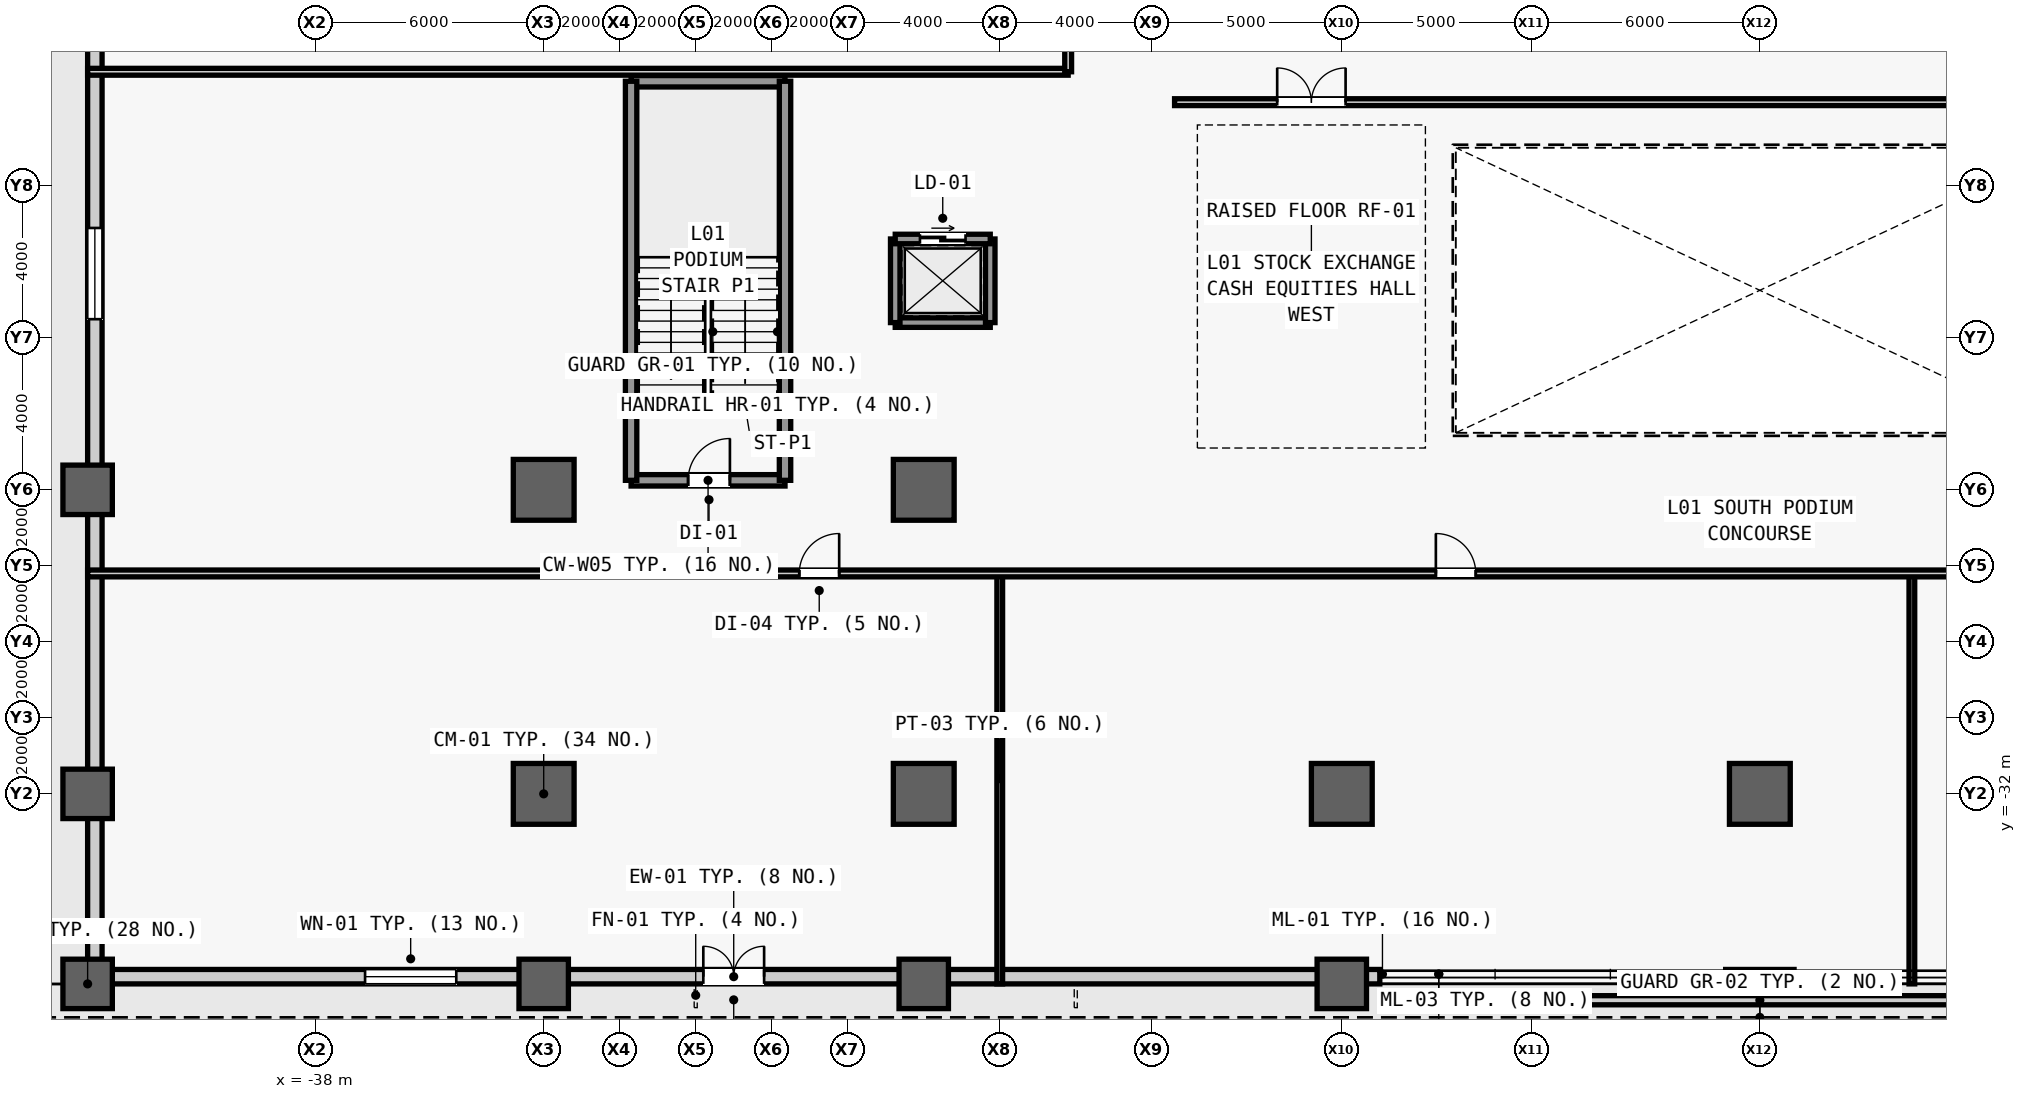
"""IFC4 building model, lengths in metres.
Left out: names, types, materials, properties, quantities, classifications, styles, units other than length and angle.
Written with IfcOpenShell. Run it as: python <this file> out.ifc"""

import sys

from ifc_helpers import new_model, si_unit, direction, frame, frame_2d, origin, origin_2d, place, context, subcontext, project, spatial, rectangle, extrude, source, transform, mapped, element, fill, save


model = new_model("IFC4")
c1 = context("Model", 3, precision=1e-05, world=origin(), true_north=direction((0.0, 1.0)))
c2 = subcontext(c1, "Body", "Model", "MODEL_VIEW")
j1 = project(units=[si_unit("LENGTHUNIT", "METRE"), si_unit("PLANEANGLEUNIT", "RADIAN")], contexts=[c1])
p1 = place(None, origin())
s1 = spatial("IfcSite", under=j1, at=p1, CompositionType="ELEMENT")
p2 = place(p1, origin())
s2 = spatial("IfcBuilding", under=s1, at=p2, CompositionType="ELEMENT")
p3 = place(p2, frame((0.0, 0.0, 6.6)))
s3 = spatial("IfcBuildingStorey", under=s2, at=p3, CompositionType="ELEMENT", Elevation=6.6)
m1 = source(origin(), c2, "Body", "SweptSolid", [
    extrude(rectangle(XDim=1.3, YDim=1.3, at=origin_2d()), origin(), (0.0, 0.0, 1.0), 5.4),
])
for number, where, z_axis, x_axis in (
    (1, (-44.0, -37.0, 0.0), (0.0, 0.0, 1.0), (1.0, 0.0, 0.0)),
    (2, (-44.0, -24.0, 0.0), (0.0, 0.0, 1.0), (1.0, 0.0, 0.0)),
    (3, (-32.0, -37.0, 0.0), (0.0, 0.0, 1.0), (1.0, 0.0, 0.0)),
):
    element("IfcColumn", number, at=place(p3, frame(where, z_axis=z_axis, x_axis=x_axis)), inside=s3, PredefinedType="COLUMN", context=c2, shape_type="MappedRepresentation", body=[
        mapped(m1, transform((0.0, 0.0, 0.0), scale=1.0)),
    ])
m2 = source(origin(), c2, "Body", "SweptSolid", [
    extrude(rectangle(XDim=1.6, YDim=1.6, at=origin_2d()), origin(), (0.0, 0.0, 1.0), 5.4),
])
for number, where, z_axis, x_axis in (
    (4, (-32.0, -32.0, 0.0), (0.0, 0.0, 1.0), (1.0, 0.0, 0.0)),
    (5, (-32.0, -24.0, 0.0), (0.0, 0.0, 1.0), (1.0, 0.0, 0.0)),
):
    element("IfcColumn", number, at=place(p3, frame(where, z_axis=z_axis, x_axis=x_axis)), inside=s3, PredefinedType="COLUMN", context=c2, shape_type="MappedRepresentation", body=[
        mapped(m2, transform((0.0, 0.0, 0.0), scale=1.0)),
    ])
p4 = place(p3, frame((-22.0, -37.0, 0.0), z_axis=(0.0, 0.0, 1.0), x_axis=(1.0, 0.0, 0.0)))
e6 = element("IfcColumn", 6, at=p4, inside=s3, PredefinedType="COLUMN", context=c2, shape_type="MappedRepresentation", body=[
    mapped(m1, transform((0.0, 0.0, 0.0), scale=1.0)),
])
for number, where, z_axis, x_axis in (
    (7, (-22.0, -32.0, 0.0), (0.0, 0.0, 1.0), (1.0, 0.0, 0.0)),
    (8, (-22.0, -24.0, 0.0), (0.0, 0.0, 1.0), (1.0, 0.0, 0.0)),
):
    element("IfcColumn", number, at=place(p3, frame(where, z_axis=z_axis, x_axis=x_axis)), inside=s3, PredefinedType="COLUMN", context=c2, shape_type="MappedRepresentation", body=[
        mapped(m2, transform((0.0, 0.0, 0.0), scale=1.0)),
    ])
p5 = place(p3, frame((-11.0, -37.0, 0.0), z_axis=(0.0, 0.0, 1.0), x_axis=(1.0, 0.0, 0.0)))
e9 = element("IfcColumn", 9, at=p5, inside=s3, PredefinedType="COLUMN", context=c2, shape_type="MappedRepresentation", body=[
    mapped(m1, transform((0.0, 0.0, 0.0), scale=1.0)),
])
for number, where, z_axis, x_axis in (
    (10, (-11.0, -32.0, 0.0), (0.0, 0.0, 1.0), (1.0, 0.0, 0.0)),
    (11, (0.0, -32.0, 0.0), (0.0, 0.0, 1.0), (1.0, 0.0, 0.0)),
):
    element("IfcColumn", number, at=place(p3, frame(where, z_axis=z_axis, x_axis=x_axis)), inside=s3, PredefinedType="COLUMN", context=c2, shape_type="MappedRepresentation", body=[
        mapped(m2, transform((0.0, 0.0, 0.0), scale=1.0)),
    ])
p6 = place(p3, frame((-44.0, -32.0, 0.0), z_axis=(0.0, 0.0, 1.0), x_axis=(1.0, 0.0, 0.0)))
e12 = element("IfcColumn", 12, at=p6, inside=s3, PredefinedType="COLUMN", context=c2, shape_type="MappedRepresentation", body=[
    mapped(m1, transform((0.0, 0.0, 0.0), scale=1.0)),
])
m3 = source(origin(), c2, "Body", "SweptSolid", [
    extrude(rectangle(XDim=34.0, YDim=0.38, at=frame_2d((17.0, 0.0))), origin(), (0.0, 0.0, 1.0), 3.28),
])
p7 = place(p3, frame((-44.0, -36.81, 0.0), z_axis=(0.0, 0.0, 1.0), x_axis=(1.0, 0.0, 0.0)))
e13 = element("IfcWall", 13, at=p7, inside=s3, PredefinedType="STANDARD", context=c2, shape_type="MappedRepresentation", body=[
    mapped(m3, transform((0.0, 0.0, 0.0), scale=1.0)),
])
m4 = source(origin(), c2, "Body", "SweptSolid", [
    extrude(rectangle(XDim=1.6, YDim=2.25, at=frame_2d((0.8, 1.125))), frame((0.0, 0.2, 0.0), z_axis=(0.0, -1.0, 0.0), x_axis=(1.0, 0.0, 0.0)), (0.0, 0.0, 1.0), 0.4),
])
p8 = place(p7, frame((16.2, 0.0, 0.0)))
e14 = element("IfcOpeningElement", 14, at=p8, cuts=e13, PredefinedType="OPENING", context=c2, shape_type="MappedRepresentation", body=[
    mapped(m4, transform((0.0, 0.0, 0.0), scale=1.0)),
])
m5 = source(origin(), c2, "Body", "SweptSolid", [
    extrude(rectangle(XDim=2.4, YDim=2.56, at=frame_2d((1.2, 1.28))), frame((0.0, 0.2, 0.0), z_axis=(0.0, -1.0, 0.0), x_axis=(1.0, 0.0, 0.0)), (0.0, 0.0, 1.0), 0.4),
])
p9 = place(p7, frame((7.3, 0.0, 0.5)))
e15 = element("IfcOpeningElement", 15, at=p9, cuts=e13, PredefinedType="OPENING", context=c2, shape_type="MappedRepresentation", body=[
    mapped(m5, transform((0.0, 0.0, 0.0), scale=1.0)),
])
m6 = source(origin(), c2, "Body", "SweptSolid", [
    extrude(rectangle(XDim=1.8, YDim=0.38, at=frame_2d((0.9, 0.0))), origin(), (0.0, 0.0, 1.0), 3.28),
])
p10 = place(p3, frame((-0.9, -36.81, 0.0), z_axis=(0.0, 0.0, 1.0), x_axis=(1.0, 0.0, 0.0)))
e16 = element("IfcWall", 16, at=p10, inside=s3, PredefinedType="STANDARD", context=c2, shape_type="MappedRepresentation", body=[
    mapped(m6, transform((0.0, 0.0, 0.0), scale=1.0)),
])
m7 = source(origin(), c2, "Body", "SweptSolid", [
    extrude(rectangle(XDim=73.24, YDim=0.38, at=frame_2d((36.62, 0.0))), origin(), (0.0, 0.0, 1.0), 3.28),
])
p11 = place(p3, frame((-43.81, -36.62, 0.0), z_axis=(0.0, 0.0, 1.0), x_axis=(0.0, 1.0, 0.0)))
e17 = element("IfcWall", 17, at=p11, inside=s3, PredefinedType="STANDARD", context=c2, shape_type="MappedRepresentation", body=[
    mapped(m7, transform((0.0, 0.0, 0.0), scale=1.0)),
])
p12 = place(p11, frame((41.82, 0.0, 0.0)))
e18 = element("IfcOpeningElement", 18, at=p12, cuts=e17, PredefinedType="OPENING", context=c2, shape_type="MappedRepresentation", body=[
    mapped(m4, transform((0.0, 0.0, 0.0), scale=1.0)),
])
p13 = place(p11, frame((17.11, 0.0, 0.5)))
e19 = element("IfcOpeningElement", 19, at=p13, cuts=e17, PredefinedType="OPENING", context=c2, shape_type="MappedRepresentation", body=[
    mapped(m5, transform((0.0, 0.0, 0.0), scale=1.0)),
])
p14 = place(p11, frame((53.73, 0.0, 0.5)))
e20 = element("IfcOpeningElement", 20, at=p14, cuts=e17, PredefinedType="OPENING", context=c2, shape_type="MappedRepresentation", body=[
    mapped(m5, transform((0.0, 0.0, 0.0), scale=1.0)),
])
m8 = source(origin(), c2, "Body", "SweptSolid", [
    extrude(rectangle(XDim=20.0, YDim=0.24, at=frame_2d((10.0, 0.0))), origin(), (0.0, 0.0, 1.0), 0.65),
])
p15 = place(p3, frame((-10.0, -37.43, 0.0), z_axis=(0.0, 0.0, 1.0), x_axis=(1.0, 0.0, 0.0)))
e21 = element("IfcWall", 21, at=p15, inside=s3, PredefinedType="STANDARD", context=c2, shape_type="MappedRepresentation", body=[
    mapped(m8, transform((0.0, 0.0, 0.0), scale=1.0)),
])
m9 = source(origin(), c2, "Body", "SweptSolid", [
    extrude(rectangle(XDim=4.05, YDim=0.3, at=frame_2d((2.025, 0.0))), origin(), (0.0, 0.0, 1.0), 5.08),
])
p16 = place(p3, frame((-29.7, -23.75, 0.0), z_axis=(0.0, 0.0, 1.0), x_axis=(1.0, 0.0, 0.0)))
e22 = element("IfcWall", 22, at=p16, inside=s3, PredefinedType="SHEAR", context=c2, shape_type="MappedRepresentation", body=[
    mapped(m9, transform((0.0, 0.0, 0.0), scale=1.0)),
])
m10 = source(origin(), c2, "Body", "SweptSolid", [
    extrude(rectangle(XDim=1.1, YDim=2.2, at=frame_2d((0.55, 1.1))), frame((0.0, 0.16, 0.0), z_axis=(0.0, -1.0, 0.0), x_axis=(1.0, 0.0, 0.0)), (0.0, 0.0, 1.0), 0.32),
])
p17 = place(p16, frame((1.5, 0.0, 0.0)))
e23 = element("IfcOpeningElement", 23, at=p17, cuts=e22, PredefinedType="OPENING", context=c2, shape_type="MappedRepresentation", body=[
    mapped(m10, transform((0.0, 0.0, 0.0), scale=1.0)),
])
p18 = place(p3, frame((-29.7, -13.25, 0.0), z_axis=(0.0, 0.0, 1.0), x_axis=(1.0, 0.0, 0.0)))
e24 = element("IfcWall", 24, at=p18, inside=s3, PredefinedType="SHEAR", context=c2, shape_type="MappedRepresentation", body=[
    mapped(m9, transform((0.0, 0.0, 0.0), scale=1.0)),
])
m11 = source(origin(), c2, "Body", "SweptSolid", [
    extrude(rectangle(XDim=10.5, YDim=0.3, at=frame_2d((5.25, 0.0))), origin(), (0.0, 0.0, 1.0), 5.08),
])
for number, where, z_axis, x_axis in (
    (25, (-29.7, -23.75, 0.0), (0.0, 0.0, 1.0), (0.0, 1.0, 0.0)),
    (26, (-25.65, -23.75, 0.0), (0.0, 0.0, 1.0), (0.0, 1.0, 0.0)),
):
    element("IfcWall", number, at=place(p3, frame(where, z_axis=z_axis, x_axis=x_axis)), inside=s3, PredefinedType="SHEAR", context=c2, shape_type="MappedRepresentation", body=[
        mapped(m11, transform((0.0, 0.0, 0.0), scale=1.0)),
    ])
m12 = source(origin(), c2, "Body", "SweptSolid", [
    extrude(rectangle(XDim=2.5, YDim=0.25, at=frame_2d((1.25, 0.0))), origin(), (0.0, 0.0, 1.0), 5.08),
])
p19 = place(p3, frame((-22.75, -19.6, 0.0), z_axis=(0.0, 0.0, 1.0), x_axis=(1.0, 0.0, 0.0)))
e27 = element("IfcWall", 27, at=p19, inside=s3, PredefinedType="SHEAR", context=c2, shape_type="MappedRepresentation", body=[
    mapped(m12, transform((0.0, 0.0, 0.0), scale=1.0)),
])
m13 = source(origin(), c2, "Body", "SweptSolid", [
    extrude(rectangle(XDim=2.2, YDim=0.25, at=frame_2d((1.1, 0.0))), origin(), (0.0, 0.0, 1.0), 5.08),
])
for number, where, z_axis, x_axis in (
    (28, (-22.75, -19.6, 0.0), (0.0, 0.0, 1.0), (0.0, 1.0, 0.0)),
    (29, (-20.25, -19.6, 0.0), (0.0, 0.0, 1.0), (0.0, 1.0, 0.0)),
):
    element("IfcWall", number, at=place(p3, frame(where, z_axis=z_axis, x_axis=x_axis)), inside=s3, PredefinedType="SHEAR", context=c2, shape_type="MappedRepresentation", body=[
        mapped(m13, transform((0.0, 0.0, 0.0), scale=1.0)),
    ])
p20 = place(p3, frame((-22.75, -17.4, 0.0), z_axis=(0.0, 0.0, 1.0), x_axis=(1.0, 0.0, 0.0)))
e30 = element("IfcWall", 30, at=p20, inside=s3, PredefinedType="SHEAR", context=c2, shape_type="MappedRepresentation", body=[
    mapped(m12, transform((0.0, 0.0, 0.0), scale=1.0)),
])
m14 = source(origin(), c2, "Body", "SweptSolid", [
    extrude(rectangle(XDim=1.2, YDim=2.3, at=frame_2d((0.6, 1.15))), frame((0.0, 0.135, 0.0), z_axis=(0.0, -1.0, 0.0), x_axis=(1.0, 0.0, 0.0)), (0.0, 0.0, 1.0), 0.27),
])
p21 = place(p20, frame((0.65, 0.0, 0.0)))
e31 = element("IfcOpeningElement", 31, at=p21, cuts=e30, PredefinedType="OPENING", context=c2, shape_type="MappedRepresentation", body=[
    mapped(m14, transform((0.0, 0.0, 0.0), scale=1.0)),
])
m15 = source(origin(), c2, "Body", "SweptSolid", [
    extrude(rectangle(XDim=30.8, YDim=0.18, at=frame_2d((15.4, 0.0))), origin(), (0.0, 0.0, 1.0), 5.08),
])
p22 = place(p3, frame((-15.4, -13.8, 0.0), z_axis=(0.0, 0.0, 1.0), x_axis=(1.0, 0.0, 0.0)))
e32 = element("IfcWall", 32, at=p22, inside=s3, PredefinedType="PARTITIONING", context=c2, shape_type="MappedRepresentation", body=[
    mapped(m15, transform((0.0, 0.0, 0.0), scale=1.0)),
])
m16 = source(origin(), c2, "Body", "SweptSolid", [
    extrude(rectangle(XDim=1.8, YDim=2.25, at=frame_2d((0.9, 1.125))), frame((0.0, 0.1, 0.0), z_axis=(0.0, -1.0, 0.0), x_axis=(1.0, 0.0, 0.0)), (0.0, 0.0, 1.0), 0.2),
])
p23 = place(p22, frame((2.7, 0.0, 0.0)))
e33 = element("IfcOpeningElement", 33, at=p23, cuts=e32, PredefinedType="OPENING", context=c2, shape_type="MappedRepresentation", body=[
    mapped(m16, transform((0.0, 0.0, 0.0), scale=1.0)),
])
p24 = place(p22, frame((26.3, 0.0, 0.0)))
e34 = element("IfcOpeningElement", 34, at=p24, cuts=e32, PredefinedType="OPENING", context=c2, shape_type="MappedRepresentation", body=[
    mapped(m16, transform((0.0, 0.0, 0.0), scale=1.0)),
])
m17 = source(origin(), c2, "Body", "SweptSolid", [
    extrude(rectangle(XDim=10.8, YDim=0.15, at=frame_2d((5.4, 0.0))), origin(), (0.0, 0.0, 1.0), 5.08),
])
for number, where, z_axis, x_axis in (
    (35, (-20.0, -37.0, 0.0), (0.0, 0.0, 1.0), (0.0, 1.0, 0.0)),
    (36, (4.0, -37.0, 0.0), (0.0, 0.0, 1.0), (0.0, 1.0, 0.0)),
):
    element("IfcWall", number, at=place(p3, frame(where, z_axis=z_axis, x_axis=x_axis)), inside=s3, PredefinedType="PARTITIONING", context=c2, shape_type="MappedRepresentation", body=[
        mapped(m17, transform((0.0, 0.0, 0.0), scale=1.0)),
    ])
m18 = source(origin(), c2, "Body", "SweptSolid", [
    extrude(rectangle(XDim=88.0, YDim=0.18, at=frame_2d((44.0, 0.0))), origin(), (0.0, 0.0, 1.0), 5.08),
])
p25 = place(p3, frame((-44.0, -26.2, 0.0), z_axis=(0.0, 0.0, 1.0), x_axis=(1.0, 0.0, 0.0)))
e37 = element("IfcWall", 37, at=p25, inside=s3, PredefinedType="PARTITIONING", context=c2, shape_type="MappedRepresentation", body=[
    mapped(m18, transform((0.0, 0.0, 0.0), scale=1.0)),
])
m19 = source(origin(), c2, "Body", "SweptSolid", [
    extrude(rectangle(XDim=1.05, YDim=2.2, at=frame_2d((0.525, 1.1))), frame((0.0, 0.1, 0.0), z_axis=(0.0, -1.0, 0.0), x_axis=(1.0, 0.0, 0.0)), (0.0, 0.0, 1.0), 0.2),
])
p26 = place(p25, frame((18.725, 0.0, 0.0)))
e38 = element("IfcOpeningElement", 38, at=p26, cuts=e37, PredefinedType="OPENING", context=c2, shape_type="MappedRepresentation", body=[
    mapped(m19, transform((0.0, 0.0, 0.0), scale=1.0)),
])
p27 = place(p25, frame((35.475, 0.0, 0.0)))
e39 = element("IfcOpeningElement", 39, at=p27, cuts=e37, PredefinedType="OPENING", context=c2, shape_type="MappedRepresentation", body=[
    mapped(m19, transform((0.0, 0.0, 0.0), scale=1.0)),
])
p28 = place(p25, frame((60.225, 0.0, 0.0)))
e40 = element("IfcOpeningElement", 40, at=p28, cuts=e37, PredefinedType="OPENING", context=c2, shape_type="MappedRepresentation", body=[
    mapped(m19, transform((0.0, 0.0, 0.0), scale=1.0)),
])
m20 = source(origin(), c2, "Body", "SweptSolid", [
    extrude(rectangle(XDim=25.8, YDim=0.18, at=frame_2d((12.9, 0.0))), origin(), (0.0, 0.0, 1.0), 5.08),
])
p29 = place(p3, frame((-44.0, -13.0, 0.0), z_axis=(0.0, 0.0, 1.0), x_axis=(1.0, 0.0, 0.0)))
e41 = element("IfcWall", 41, at=p29, inside=s3, PredefinedType="PARTITIONING", context=c2, shape_type="MappedRepresentation", body=[
    mapped(m20, transform((0.0, 0.0, 0.0), scale=1.0)),
])
m21 = source(origin(), c2, "Body", "SweptSolid", [
    extrude(rectangle(XDim=24.3, YDim=0.18, at=frame_2d((12.15, 0.0))), origin(), (0.0, 0.0, 1.0), 5.08),
])
p30 = place(p3, frame((-18.2, -13.0, 0.0), z_axis=(0.0, 0.0, 1.0), x_axis=(0.0, 1.0, 0.0)))
e42 = element("IfcWall", 42, at=p30, inside=s3, PredefinedType="PARTITIONING", context=c2, shape_type="MappedRepresentation", body=[
    mapped(m21, transform((0.0, 0.0, 0.0), scale=1.0)),
])
m22 = source(origin(), c2, "Body", "SweptSolid", [
    extrude(rectangle(XDim=0.95, YDim=2.15, at=frame_2d((0.475, 1.075))), frame((0.0, 0.1, 0.0), z_axis=(0.0, -1.0, 0.0), x_axis=(1.0, 0.0, 0.0)), (0.0, 0.0, 1.0), 0.2),
])
p31 = place(p30, frame((6.025, 0.0, 0.0)))
e43 = element("IfcOpeningElement", 43, at=p31, cuts=e42, PredefinedType="OPENING", context=c2, shape_type="MappedRepresentation", body=[
    mapped(m22, transform((0.0, 0.0, 0.0), scale=1.0)),
])
p32 = place(p30, frame((18.175, 0.0, 0.0)))
e44 = element("IfcOpeningElement", 44, at=p32, cuts=e42, PredefinedType="OPENING", context=c2, shape_type="MappedRepresentation", body=[
    mapped(m22, transform((0.0, 0.0, 0.0), scale=1.0)),
])
m23 = source(origin(), c2, "Body", "SweptSolid", [
    extrude(rectangle(XDim=1.6, YDim=2.25, at=frame_2d((0.8, 1.125))), frame((0.0, 0.025, 0.0), z_axis=(0.0, -1.0, 0.0), x_axis=(1.0, 0.0, 0.0)), (0.0, 0.0, 1.0), 0.05),
])
p33 = place(p8, origin())
e45 = element("IfcDoor", 45, at=p33, inside=s3, OperationType="DOUBLE_DOOR_SINGLE_SWING", PredefinedType="DOOR", context=c2, shape_type="MappedRepresentation", body=[
    mapped(m23, transform((0.0, 0.0, 0.0), scale=1.0)),
])
fill(e14, e45)
m24 = source(origin(), c2, "Body", "SweptSolid", [
    extrude(rectangle(XDim=2.4, YDim=2.56, at=frame_2d((1.2, 1.28))), frame((0.0, 0.03, 0.0), z_axis=(0.0, -1.0, 0.0), x_axis=(1.0, 0.0, 0.0)), (0.0, 0.0, 1.0), 0.06),
])
p34 = place(p9, origin())
e46 = element("IfcWindow", 46, at=p34, inside=s3, PartitioningType="SINGLE_PANEL", PredefinedType="WINDOW", context=c2, shape_type="MappedRepresentation", body=[
    mapped(m24, transform((0.0, 0.0, 0.0), scale=1.0)),
])
fill(e15, e46)
p35 = place(p13, origin())
e47 = element("IfcWindow", 47, at=p35, inside=s3, PartitioningType="SINGLE_PANEL", PredefinedType="WINDOW", context=c2, shape_type="MappedRepresentation", body=[
    mapped(m24, transform((0.0, 0.0, 0.0), scale=1.0)),
])
fill(e19, e47)
m25 = source(origin(), c2, "Body", "SweptSolid", [
    extrude(rectangle(XDim=1.1, YDim=2.2, at=frame_2d((0.55, 1.1))), frame((0.0, 0.025, 0.0), z_axis=(0.0, -1.0, 0.0), x_axis=(1.0, 0.0, 0.0)), (0.0, 0.0, 1.0), 0.05),
])
p36 = place(p17, origin())
e48 = element("IfcDoor", 48, at=p36, inside=s3, OperationType="SINGLE_SWING_RIGHT", PredefinedType="DOOR", context=c2, shape_type="MappedRepresentation", body=[
    mapped(m25, transform((0.0, 0.0, 0.0), scale=1.0)),
])
fill(e23, e48)
m26 = source(origin(), c2, "Body", "SweptSolid", [
    extrude(rectangle(XDim=1.8, YDim=2.25, at=frame_2d((0.9, 1.125))), frame((0.0, 0.025, 0.0), z_axis=(0.0, -1.0, 0.0), x_axis=(1.0, 0.0, 0.0)), (0.0, 0.0, 1.0), 0.05),
])
p37 = place(p23, origin())
e49 = element("IfcDoor", 49, at=p37, inside=s3, OperationType="SINGLE_SWING_LEFT", PredefinedType="DOOR", context=c2, shape_type="MappedRepresentation", body=[
    mapped(m26, transform((0.0, 0.0, 0.0), scale=1.0)),
])
fill(e33, e49)
m27 = source(origin(), c2, "Body", "SweptSolid", [
    extrude(rectangle(XDim=1.05, YDim=2.2, at=frame_2d((0.525, 1.1))), frame((0.0, 0.025, 0.0), z_axis=(0.0, -1.0, 0.0), x_axis=(1.0, 0.0, 0.0)), (0.0, 0.0, 1.0), 0.05),
])
p38 = place(p26, origin())
e50 = element("IfcDoor", 50, at=p38, inside=s3, OperationType="SINGLE_SWING_RIGHT", PredefinedType="DOOR", context=c2, shape_type="MappedRepresentation", body=[
    mapped(m27, transform((0.0, 0.0, 0.0), scale=1.0)),
])
fill(e38, e50)
p39 = place(p27, origin())
e51 = element("IfcDoor", 51, at=p39, inside=s3, OperationType="SINGLE_SWING_LEFT", PredefinedType="DOOR", context=c2, shape_type="MappedRepresentation", body=[
    mapped(m27, transform((0.0, 0.0, 0.0), scale=1.0)),
])
fill(e39, e51)
m28 = source(origin(), c2, "Body", "SweptSolid", [
    extrude(rectangle(XDim=1.2, YDim=2.3, at=frame_2d((0.6, 1.15))), frame((0.0, 0.025, 0.0), z_axis=(0.0, -1.0, 0.0), x_axis=(1.0, 0.0, 0.0)), (0.0, 0.0, 1.0), 0.05),
])
p40 = place(p21, origin())
e52 = element("IfcDoor", 52, at=p40, inside=s3, OperationType="SLIDING_TO_LEFT", PredefinedType="DOOR", context=c2, shape_type="MappedRepresentation", body=[
    mapped(m28, transform((0.0, 0.0, 0.0), scale=1.0)),
])
fill(e31, e52)
save(model, sys.argv[1])
